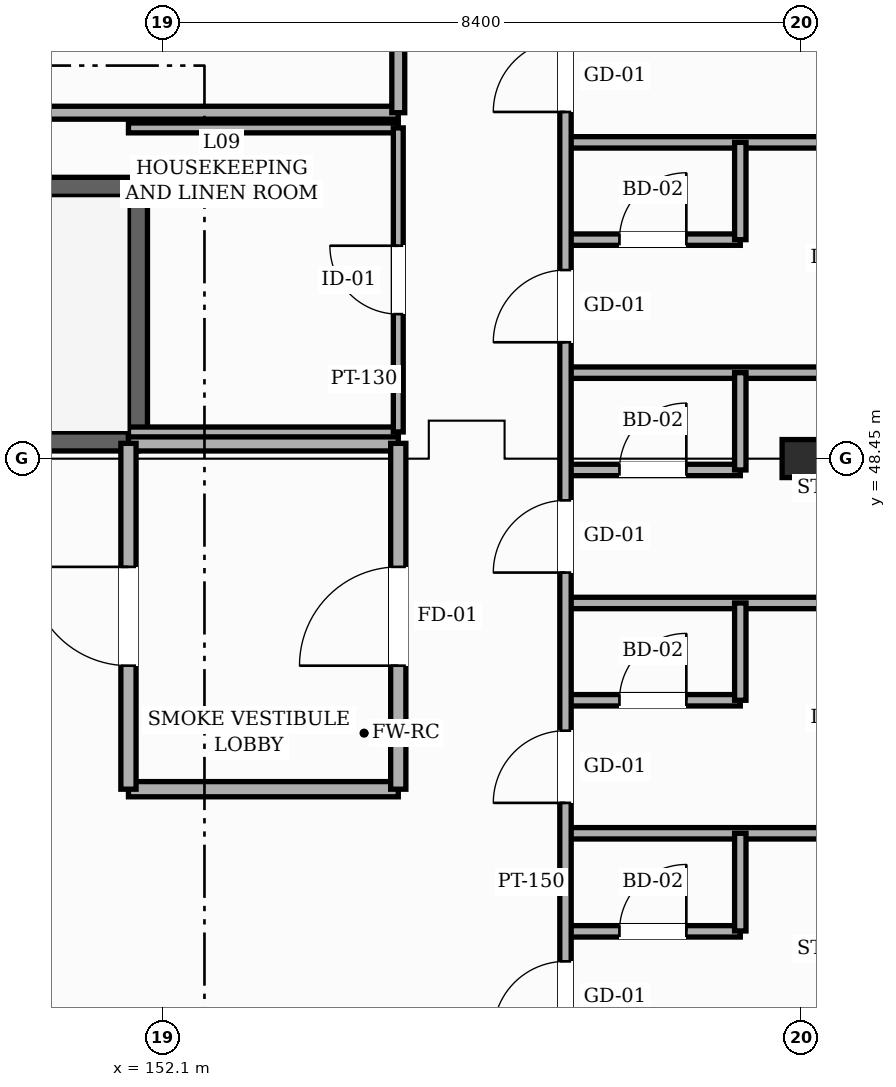
"""IFC4 building model, lengths in metres.
Left out: names, types, materials, properties, quantities, classifications, styles, units other than length and angle.
Written with IfcOpenShell. Run it as: python <this file> out.ifc"""

import sys

from ifc_helpers import new_model, si_unit, direction, frame, frame_2d, origin, origin_2d, place, context, subcontext, project, spatial, rectangle, hollow_rectangle, extrude, element, fill, save


model = new_model("IFC4")
c1 = context("Model", 3, precision=1e-05, world=origin(), true_north=direction((0.0, 1.0)))
c2 = subcontext(c1, "Body", "Model", "MODEL_VIEW")
j1 = project(units=[si_unit("LENGTHUNIT", "METRE"), si_unit("PLANEANGLEUNIT", "RADIAN")], contexts=[c1])
p1 = place(None, origin())
s1 = spatial("IfcSite", under=j1, at=p1, CompositionType="ELEMENT")
p2 = place(p1, origin())
s2 = spatial("IfcBuilding", under=s1, at=p2, CompositionType="ELEMENT")
p3 = place(p2, frame((0.0, 0.0, 39.0)))
s3 = spatial("IfcBuildingStorey", under=s2, at=p3, CompositionType="ELEMENT", Elevation=39.0)
p4 = place(p3, frame((160.5, 48.45, 0.0), z_axis=(0.0, 0.0, 1.0), x_axis=(1.0, 0.0, 0.0)))
e1 = element("IfcColumn", 1, at=p4, inside=s3, PredefinedType="COLUMN", context=c2, shape_type="SweptSolid", body=[
    extrude(hollow_rectangle(XDim=0.5, YDim=0.5, WallThickness=0.022, InnerFilletRadius=0.022, OuterFilletRadius=0.044, at=origin_2d()), origin(), (0.0, 0.0, 1.0), 3.6),
])
p5 = place(p3, frame((151.775, 52.025, 0.0), z_axis=(0.0, 0.0, 1.0), x_axis=(0.0, -1.0, 0.0)))
e2 = element("IfcWall", 2, at=p5, inside=s3, PredefinedType="SHEAR", context=c2, shape_type="SweptSolid", body=[
    extrude(rectangle(XDim=3.35, YDim=0.25, at=frame_2d((1.675, 0.0))), origin(), (0.0, 0.0, 1.0), 3.38),
])
p6 = place(p3, frame((151.775, 48.675, 0.0), z_axis=(0.0, 0.0, 1.0), x_axis=(-1.0, 0.0, 0.0)))
e3 = element("IfcWall", 3, at=p6, inside=s3, PredefinedType="SHEAR", context=c2, shape_type="SweptSolid", body=[
    extrude(rectangle(XDim=7.9, YDim=0.25, at=frame_2d((3.95, 0.0))), origin(), (0.0, 0.0, 1.0), 3.38),
])
p7 = place(p6, frame((6.075, 0.0, 0.0)))
e4 = element("IfcOpeningElement", 4, at=p7, cuts=e3, PredefinedType="OPENING", context=c2, shape_type="SweptSolid", body=[
    extrude(rectangle(XDim=1.3, YDim=2.2, at=frame_2d((0.65, 1.1))), frame((0.0, 0.135, 0.0), z_axis=(0.0, -1.0, 0.0), x_axis=(1.0, 0.0, 0.0)), (0.0, 0.0, 1.0), 0.27),
])
p8 = place(p3, frame((143.875, 52.025, 0.0), z_axis=(0.0, 0.0, 1.0), x_axis=(1.0, 0.0, 0.0)))
e5 = element("IfcWall", 5, at=p8, inside=s3, PredefinedType="SHEAR", context=c2, shape_type="SweptSolid", body=[
    extrude(rectangle(XDim=7.9, YDim=0.25, at=frame_2d((3.95, 0.0))), origin(), (0.0, 0.0, 1.0), 3.38),
])
p9 = place(p3, frame((157.4, 42.23, 0.0), z_axis=(0.0, 0.0, 1.0), x_axis=(1.0, 0.0, 0.0)))
e6 = element("IfcWall", 6, at=p9, inside=s3, PredefinedType="PARTITIONING", context=c2, shape_type="SweptSolid", body=[
    extrude(rectangle(XDim=2.3, YDim=0.15, at=frame_2d((1.15, 0.0))), origin(), (0.0, 0.0, 1.0), 3.365),
])
p10 = place(p9, frame((0.71, 0.0, 0.0)))
e7 = element("IfcOpeningElement", 7, at=p10, cuts=e6, PredefinedType="OPENING", context=c2, shape_type="SweptSolid", body=[
    extrude(rectangle(XDim=0.88, YDim=2.12, at=frame_2d((0.44, 1.06))), frame((0.0, 0.085, 0.0), z_axis=(0.0, -1.0, 0.0), x_axis=(1.0, 0.0, 0.0)), (0.0, 0.0, 1.0), 0.17),
])
p11 = place(p3, frame((157.4, 43.52, 0.0), z_axis=(0.0, 0.0, 1.0), x_axis=(1.0, 0.0, 0.0)))
e8 = element("IfcWall", 8, at=p11, inside=s3, PredefinedType="PARTITIONING", context=c2, shape_type="SweptSolid", body=[
    extrude(rectangle(XDim=9.8, YDim=0.15, at=frame_2d((4.9, 0.0))), origin(), (0.0, 0.0, 1.0), 3.365),
])
p12 = place(p3, frame((151.65, 44.1, 0.0), z_axis=(0.0, 0.0, 1.0), x_axis=(1.0, 0.0, 0.0)))
e9 = element("IfcWall", 9, at=p12, inside=s3, PredefinedType="SOLIDWALL", context=c2, shape_type="SweptSolid", body=[
    extrude(rectangle(XDim=3.55, YDim=0.2, at=frame_2d((1.775, 0.0))), origin(), (0.0, 0.0, 1.0), 3.365),
])
p13 = place(p3, frame((157.4, 45.27, 0.0), z_axis=(0.0, 0.0, 1.0), x_axis=(1.0, 0.0, 0.0)))
e10 = element("IfcWall", 10, at=p13, inside=s3, PredefinedType="PARTITIONING", context=c2, shape_type="SweptSolid", body=[
    extrude(rectangle(XDim=2.3, YDim=0.15, at=frame_2d((1.15, 0.0))), origin(), (0.0, 0.0, 1.0), 3.365),
])
p14 = place(p13, frame((0.71, 0.0, 0.0)))
e11 = element("IfcOpeningElement", 11, at=p14, cuts=e10, PredefinedType="OPENING", context=c2, shape_type="SweptSolid", body=[
    extrude(rectangle(XDim=0.88, YDim=2.12, at=frame_2d((0.44, 1.06))), frame((0.0, 0.085, 0.0), z_axis=(0.0, -1.0, 0.0), x_axis=(1.0, 0.0, 0.0)), (0.0, 0.0, 1.0), 0.17),
])
p15 = place(p3, frame((157.4, 46.55, 0.0), z_axis=(0.0, 0.0, 1.0), x_axis=(1.0, 0.0, 0.0)))
e12 = element("IfcWall", 12, at=p15, inside=s3, PredefinedType="PARTITIONING", context=c2, shape_type="SweptSolid", body=[
    extrude(rectangle(XDim=9.8, YDim=0.15, at=frame_2d((4.9, 0.0))), origin(), (0.0, 0.0, 1.0), 3.365),
])
p16 = place(p3, frame((157.4, 48.3, 0.0), z_axis=(0.0, 0.0, 1.0), x_axis=(1.0, 0.0, 0.0)))
e13 = element("IfcWall", 13, at=p16, inside=s3, PredefinedType="PARTITIONING", context=c2, shape_type="SweptSolid", body=[
    extrude(rectangle(XDim=2.3, YDim=0.15, at=frame_2d((1.15, 0.0))), origin(), (0.0, 0.0, 1.0), 3.365),
])
p17 = place(p16, frame((0.71, 0.0, 0.0)))
e14 = element("IfcOpeningElement", 14, at=p17, cuts=e13, PredefinedType="OPENING", context=c2, shape_type="SweptSolid", body=[
    extrude(rectangle(XDim=0.88, YDim=2.12, at=frame_2d((0.44, 1.06))), frame((0.0, 0.085, 0.0), z_axis=(0.0, -1.0, 0.0), x_axis=(1.0, 0.0, 0.0)), (0.0, 0.0, 1.0), 0.17),
])
p18 = place(p3, frame((151.65, 48.65, 0.0), z_axis=(0.0, 0.0, 1.0), x_axis=(1.0, 0.0, 0.0)))
e15 = element("IfcWall", 15, at=p18, inside=s3, PredefinedType="SOLIDWALL", context=c2, shape_type="SweptSolid", body=[
    extrude(rectangle(XDim=3.55, YDim=0.2, at=frame_2d((1.775, 0.0))), origin(), (0.0, 0.0, 1.0), 3.365),
])
p19 = place(p3, frame((151.65, 48.8, 0.0), z_axis=(0.0, 0.0, 1.0), x_axis=(1.0, 0.0, 0.0)))
e16 = element("IfcWall", 16, at=p19, inside=s3, PredefinedType="PARTITIONING", context=c2, shape_type="SweptSolid", body=[
    extrude(rectangle(XDim=3.55, YDim=0.13, at=frame_2d((1.775, 0.0))), origin(), (0.0, 0.0, 1.0), 3.365),
])
p20 = place(p3, frame((157.4, 49.58, 0.0), z_axis=(0.0, 0.0, 1.0), x_axis=(1.0, 0.0, 0.0)))
e17 = element("IfcWall", 17, at=p20, inside=s3, PredefinedType="PARTITIONING", context=c2, shape_type="SweptSolid", body=[
    extrude(rectangle(XDim=9.8, YDim=0.15, at=frame_2d((4.9, 0.0))), origin(), (0.0, 0.0, 1.0), 3.365),
])
p21 = place(p3, frame((157.4, 51.33, 0.0), z_axis=(0.0, 0.0, 1.0), x_axis=(1.0, 0.0, 0.0)))
e18 = element("IfcWall", 18, at=p21, inside=s3, PredefinedType="PARTITIONING", context=c2, shape_type="SweptSolid", body=[
    extrude(rectangle(XDim=2.3, YDim=0.15, at=frame_2d((1.15, 0.0))), origin(), (0.0, 0.0, 1.0), 3.365),
])
p22 = place(p21, frame((0.71, 0.0, 0.0)))
e19 = element("IfcOpeningElement", 19, at=p22, cuts=e18, PredefinedType="OPENING", context=c2, shape_type="SweptSolid", body=[
    extrude(rectangle(XDim=0.88, YDim=2.12, at=frame_2d((0.44, 1.06))), frame((0.0, 0.085, 0.0), z_axis=(0.0, -1.0, 0.0), x_axis=(1.0, 0.0, 0.0)), (0.0, 0.0, 1.0), 0.17),
])
p23 = place(p3, frame((157.4, 52.61, 0.0), z_axis=(0.0, 0.0, 1.0), x_axis=(1.0, 0.0, 0.0)))
e20 = element("IfcWall", 20, at=p23, inside=s3, PredefinedType="PARTITIONING", context=c2, shape_type="SweptSolid", body=[
    extrude(rectangle(XDim=9.8, YDim=0.15, at=frame_2d((4.9, 0.0))), origin(), (0.0, 0.0, 1.0), 3.055),
])
p24 = place(p3, frame((151.65, 52.8, 0.0), z_axis=(0.0, 0.0, 1.0), x_axis=(1.0, 0.0, 0.0)))
e21 = element("IfcWall", 21, at=p24, inside=s3, PredefinedType="PARTITIONING", context=c2, shape_type="SweptSolid", body=[
    extrude(rectangle(XDim=3.55, YDim=0.13, at=frame_2d((1.775, 0.0))), origin(), (0.0, 0.0, 1.0), 3.365),
])
p25 = place(p3, frame((144.8, 53.0, 0.0), z_axis=(0.0, 0.0, 1.0), x_axis=(1.0, 0.0, 0.0)))
e22 = element("IfcWall", 22, at=p25, inside=s3, PredefinedType="PARTITIONING", context=c2, shape_type="SweptSolid", body=[
    extrude(rectangle(XDim=10.4, YDim=0.17, at=frame_2d((5.2, 0.0))), origin(), (0.0, 0.0, 1.0), 3.365),
])
p26 = place(p3, frame((151.65, 44.1, 0.0), z_axis=(0.0, 0.0, 1.0), x_axis=(0.0, 1.0, 0.0)))
e23 = element("IfcWall", 23, at=p26, inside=s3, PredefinedType="SOLIDWALL", context=c2, shape_type="SweptSolid", body=[
    extrude(rectangle(XDim=4.55, YDim=0.2, at=frame_2d((2.275, 0.0))), origin(), (0.0, 0.0, 1.0), 3.365),
])
p27 = place(p26, frame((1.625, 0.0, 0.0)))
e24 = element("IfcOpeningElement", 24, at=p27, cuts=e23, PredefinedType="OPENING", context=c2, shape_type="SweptSolid", body=[
    extrude(rectangle(XDim=1.3, YDim=2.2, at=frame_2d((0.65, 1.1))), frame((0.0, 0.11, 0.0), z_axis=(0.0, -1.0, 0.0), x_axis=(1.0, 0.0, 0.0)), (0.0, 0.0, 1.0), 0.22),
])
p28 = place(p3, frame((155.2, 44.1, 0.0), z_axis=(0.0, 0.0, 1.0), x_axis=(0.0, 1.0, 0.0)))
e25 = element("IfcWall", 25, at=p28, inside=s3, PredefinedType="SOLIDWALL", context=c2, shape_type="SweptSolid", body=[
    extrude(rectangle(XDim=4.55, YDim=0.2, at=frame_2d((2.275, 0.0))), origin(), (0.0, 0.0, 1.0), 3.365),
])
p29 = place(p28, frame((1.625, 0.0, 0.0)))
e26 = element("IfcOpeningElement", 26, at=p29, cuts=e25, PredefinedType="OPENING", context=c2, shape_type="SweptSolid", body=[
    extrude(rectangle(XDim=1.3, YDim=2.2, at=frame_2d((0.65, 1.1))), frame((0.0, 0.11, 0.0), z_axis=(0.0, -1.0, 0.0), x_axis=(1.0, 0.0, 0.0)), (0.0, 0.0, 1.0), 0.22),
])
p30 = place(p3, frame((155.2, 48.8, 0.0), z_axis=(0.0, 0.0, 1.0), x_axis=(0.0, 1.0, 0.0)))
e27 = element("IfcWall", 27, at=p30, inside=s3, PredefinedType="PARTITIONING", context=c2, shape_type="SweptSolid", body=[
    extrude(rectangle(XDim=4.0, YDim=0.13, at=frame_2d((2.0, 0.0))), origin(), (0.0, 0.0, 1.0), 3.365),
])
p31 = place(p30, frame((1.55, 0.0, 0.0)))
e28 = element("IfcOpeningElement", 28, at=p31, cuts=e27, PredefinedType="OPENING", context=c2, shape_type="SweptSolid", body=[
    extrude(rectangle(XDim=0.9, YDim=2.15, at=frame_2d((0.45, 1.075))), frame((0.0, 0.075, 0.0), z_axis=(0.0, -1.0, 0.0), x_axis=(1.0, 0.0, 0.0)), (0.0, 0.0, 1.0), 0.15),
])
p32 = place(p3, frame((155.2, 53.0, 0.0), z_axis=(0.0, 0.0, 1.0), x_axis=(0.0, 1.0, 0.0)))
e29 = element("IfcWall", 29, at=p32, inside=s3, PredefinedType="PARTITIONING", context=c2, shape_type="SweptSolid", body=[
    extrude(rectangle(XDim=6.45, YDim=0.17, at=frame_2d((3.225, 0.0))), origin(), (0.0, 0.0, 1.0), 3.365),
])
p33 = place(p32, frame((2.625, 0.0, 0.0)))
e30 = element("IfcOpeningElement", 30, at=p33, cuts=e29, PredefinedType="OPENING", context=c2, shape_type="SweptSolid", body=[
    extrude(rectangle(XDim=1.2, YDim=2.2, at=frame_2d((0.6, 1.1))), frame((0.0, 0.095, 0.0), z_axis=(0.0, -1.0, 0.0), x_axis=(1.0, 0.0, 0.0)), (0.0, 0.0, 1.0), 0.19),
])
p34 = place(p3, frame((157.4, 22.3, 0.0), z_axis=(0.0, 0.0, 1.0), x_axis=(0.0, 1.0, 0.0)))
e31 = element("IfcWall", 31, at=p34, inside=s3, PredefinedType="PARTITIONING", context=c2, shape_type="SweptSolid", body=[
    extrude(rectangle(XDim=48.5, YDim=0.15, at=frame_2d((24.25, 0.0))), origin(), (0.0, 0.0, 1.0), 3.365),
])
p35 = place(p34, frame((0.325, 0.0, 0.0)))
e32 = element("IfcOpeningElement", 32, at=p35, cuts=e31, PredefinedType="OPENING", context=c2, shape_type="SweptSolid", body=[
    extrude(rectangle(XDim=1.1, YDim=2.2, at=frame_2d((0.55, 1.1))), frame((0.0, 0.085, 0.0), z_axis=(0.0, -1.0, 0.0), x_axis=(1.0, 0.0, 0.0)), (0.0, 0.0, 1.0), 0.17),
])
p36 = place(p34, frame((3.43, 0.0, 0.0)))
e33 = element("IfcOpeningElement", 33, at=p36, cuts=e31, PredefinedType="OPENING", context=c2, shape_type="SweptSolid", body=[
    extrude(rectangle(XDim=0.95, YDim=2.15, at=frame_2d((0.475, 1.075))), frame((0.0, 0.085, 0.0), z_axis=(0.0, -1.0, 0.0), x_axis=(1.0, 0.0, 0.0)), (0.0, 0.0, 1.0), 0.17),
])
p37 = place(p34, frame((6.46, 0.0, 0.0)))
e34 = element("IfcOpeningElement", 34, at=p37, cuts=e31, PredefinedType="OPENING", context=c2, shape_type="SweptSolid", body=[
    extrude(rectangle(XDim=0.95, YDim=2.15, at=frame_2d((0.475, 1.075))), frame((0.0, 0.085, 0.0), z_axis=(0.0, -1.0, 0.0), x_axis=(1.0, 0.0, 0.0)), (0.0, 0.0, 1.0), 0.17),
])
p38 = place(p34, frame((9.495, 0.0, 0.0)))
e35 = element("IfcOpeningElement", 35, at=p38, cuts=e31, PredefinedType="OPENING", context=c2, shape_type="SweptSolid", body=[
    extrude(rectangle(XDim=0.95, YDim=2.15, at=frame_2d((0.475, 1.075))), frame((0.0, 0.085, 0.0), z_axis=(0.0, -1.0, 0.0), x_axis=(1.0, 0.0, 0.0)), (0.0, 0.0, 1.0), 0.17),
])
p39 = place(p34, frame((12.525, 0.0, 0.0)))
e36 = element("IfcOpeningElement", 36, at=p39, cuts=e31, PredefinedType="OPENING", context=c2, shape_type="SweptSolid", body=[
    extrude(rectangle(XDim=0.95, YDim=2.15, at=frame_2d((0.475, 1.075))), frame((0.0, 0.085, 0.0), z_axis=(0.0, -1.0, 0.0), x_axis=(1.0, 0.0, 0.0)), (0.0, 0.0, 1.0), 0.17),
])
p40 = place(p34, frame((15.555, 0.0, 0.0)))
e37 = element("IfcOpeningElement", 37, at=p40, cuts=e31, PredefinedType="OPENING", context=c2, shape_type="SweptSolid", body=[
    extrude(rectangle(XDim=0.95, YDim=2.15, at=frame_2d((0.475, 1.075))), frame((0.0, 0.085, 0.0), z_axis=(0.0, -1.0, 0.0), x_axis=(1.0, 0.0, 0.0)), (0.0, 0.0, 1.0), 0.17),
])
p41 = place(p34, frame((18.585, 0.0, 0.0)))
e38 = element("IfcOpeningElement", 38, at=p41, cuts=e31, PredefinedType="OPENING", context=c2, shape_type="SweptSolid", body=[
    extrude(rectangle(XDim=0.95, YDim=2.15, at=frame_2d((0.475, 1.075))), frame((0.0, 0.085, 0.0), z_axis=(0.0, -1.0, 0.0), x_axis=(1.0, 0.0, 0.0)), (0.0, 0.0, 1.0), 0.17),
])
p42 = place(p34, frame((21.62, 0.0, 0.0)))
e39 = element("IfcOpeningElement", 39, at=p42, cuts=e31, PredefinedType="OPENING", context=c2, shape_type="SweptSolid", body=[
    extrude(rectangle(XDim=0.95, YDim=2.15, at=frame_2d((0.475, 1.075))), frame((0.0, 0.085, 0.0), z_axis=(0.0, -1.0, 0.0), x_axis=(1.0, 0.0, 0.0)), (0.0, 0.0, 1.0), 0.17),
])
p43 = place(p34, frame((24.65, 0.0, 0.0)))
e40 = element("IfcOpeningElement", 40, at=p43, cuts=e31, PredefinedType="OPENING", context=c2, shape_type="SweptSolid", body=[
    extrude(rectangle(XDim=0.95, YDim=2.15, at=frame_2d((0.475, 1.075))), frame((0.0, 0.085, 0.0), z_axis=(0.0, -1.0, 0.0), x_axis=(1.0, 0.0, 0.0)), (0.0, 0.0, 1.0), 0.17),
])
p44 = place(p34, frame((27.68, 0.0, 0.0)))
e41 = element("IfcOpeningElement", 41, at=p44, cuts=e31, PredefinedType="OPENING", context=c2, shape_type="SweptSolid", body=[
    extrude(rectangle(XDim=0.95, YDim=2.15, at=frame_2d((0.475, 1.075))), frame((0.0, 0.085, 0.0), z_axis=(0.0, -1.0, 0.0), x_axis=(1.0, 0.0, 0.0)), (0.0, 0.0, 1.0), 0.17),
])
p45 = place(p34, frame((30.71, 0.0, 0.0)))
e42 = element("IfcOpeningElement", 42, at=p45, cuts=e31, PredefinedType="OPENING", context=c2, shape_type="SweptSolid", body=[
    extrude(rectangle(XDim=0.95, YDim=2.15, at=frame_2d((0.475, 1.075))), frame((0.0, 0.085, 0.0), z_axis=(0.0, -1.0, 0.0), x_axis=(1.0, 0.0, 0.0)), (0.0, 0.0, 1.0), 0.17),
])
p46 = place(p34, frame((33.745, 0.0, 0.0)))
e43 = element("IfcOpeningElement", 43, at=p46, cuts=e31, PredefinedType="OPENING", context=c2, shape_type="SweptSolid", body=[
    extrude(rectangle(XDim=0.95, YDim=2.15, at=frame_2d((0.475, 1.075))), frame((0.0, 0.085, 0.0), z_axis=(0.0, -1.0, 0.0), x_axis=(1.0, 0.0, 0.0)), (0.0, 0.0, 1.0), 0.17),
])
p47 = place(p34, frame((36.775, 0.0, 0.0)))
e44 = element("IfcOpeningElement", 44, at=p47, cuts=e31, PredefinedType="OPENING", context=c2, shape_type="SweptSolid", body=[
    extrude(rectangle(XDim=0.95, YDim=2.15, at=frame_2d((0.475, 1.075))), frame((0.0, 0.085, 0.0), z_axis=(0.0, -1.0, 0.0), x_axis=(1.0, 0.0, 0.0)), (0.0, 0.0, 1.0), 0.17),
])
p48 = place(p34, frame((39.805, 0.0, 0.0)))
e45 = element("IfcOpeningElement", 45, at=p48, cuts=e31, PredefinedType="OPENING", context=c2, shape_type="SweptSolid", body=[
    extrude(rectangle(XDim=0.95, YDim=2.15, at=frame_2d((0.475, 1.075))), frame((0.0, 0.085, 0.0), z_axis=(0.0, -1.0, 0.0), x_axis=(1.0, 0.0, 0.0)), (0.0, 0.0, 1.0), 0.17),
])
p49 = place(p34, frame((42.84, 0.0, 0.0)))
e46 = element("IfcOpeningElement", 46, at=p49, cuts=e31, PredefinedType="OPENING", context=c2, shape_type="SweptSolid", body=[
    extrude(rectangle(XDim=0.95, YDim=2.15, at=frame_2d((0.475, 1.075))), frame((0.0, 0.085, 0.0), z_axis=(0.0, -1.0, 0.0), x_axis=(1.0, 0.0, 0.0)), (0.0, 0.0, 1.0), 0.17),
])
p50 = place(p34, frame((45.87, 0.0, 0.0)))
e47 = element("IfcOpeningElement", 47, at=p50, cuts=e31, PredefinedType="OPENING", context=c2, shape_type="SweptSolid", body=[
    extrude(rectangle(XDim=0.95, YDim=2.15, at=frame_2d((0.475, 1.075))), frame((0.0, 0.085, 0.0), z_axis=(0.0, -1.0, 0.0), x_axis=(1.0, 0.0, 0.0)), (0.0, 0.0, 1.0), 0.17),
])
p51 = place(p3, frame((159.7, 42.235, 0.0), z_axis=(0.0, 0.0, 1.0), x_axis=(0.0, 1.0, 0.0)))
e48 = element("IfcWall", 48, at=p51, inside=s3, PredefinedType="PARTITIONING", context=c2, shape_type="SweptSolid", body=[
    extrude(rectangle(XDim=1.285, YDim=0.15, at=frame_2d((0.643, 0.0))), origin(), (0.0, 0.0, 1.0), 3.365),
])
for number, where, z_axis, x_axis in (
    (49, (159.7, 45.27, 0.0), (0.0, 0.0, 1.0), (0.0, 1.0, 0.0)),
    (50, (159.7, 48.3, 0.0), (0.0, 0.0, 1.0), (0.0, 1.0, 0.0)),
    (51, (159.7, 51.33, 0.0), (0.0, 0.0, 1.0), (0.0, 1.0, 0.0)),
):
    element("IfcWall", number, at=place(p3, frame(where, z_axis=z_axis, x_axis=x_axis)), inside=s3, PredefinedType="PARTITIONING", context=c2, shape_type="SweptSolid", body=[
        extrude(rectangle(XDim=1.28, YDim=0.15, at=frame_2d((0.64, 0.0))), origin(), (0.0, 0.0, 1.0), 3.365),
    ])
p52 = place(p27, origin())
e52 = element("IfcDoor", 52, at=p52, inside=s3, OperationType="SINGLE_SWING_RIGHT", PredefinedType="DOOR", context=c2, shape_type="SweptSolid", body=[
    extrude(rectangle(XDim=1.3, YDim=2.2, at=frame_2d((0.65, 1.1))), frame((0.0, 0.025, 0.0), z_axis=(0.0, -1.0, 0.0), x_axis=(1.0, 0.0, 0.0)), (0.0, 0.0, 1.0), 0.05),
])
fill(e24, e52)
p53 = place(p29, origin())
e53 = element("IfcDoor", 53, at=p53, inside=s3, OperationType="SINGLE_SWING_LEFT", PredefinedType="DOOR", context=c2, shape_type="SweptSolid", body=[
    extrude(rectangle(XDim=1.3, YDim=2.2, at=frame_2d((0.65, 1.1))), frame((0.0, 0.025, 0.0), z_axis=(0.0, -1.0, 0.0), x_axis=(1.0, 0.0, 0.0)), (0.0, 0.0, 1.0), 0.05),
])
fill(e26, e53)
p54 = place(p31, origin())
e54 = element("IfcDoor", 54, at=p54, inside=s3, OperationType="SINGLE_SWING_RIGHT", PredefinedType="DOOR", context=c2, shape_type="SweptSolid", body=[
    extrude(rectangle(XDim=0.9, YDim=2.15, at=frame_2d((0.45, 1.075))), frame((0.0, 0.025, 0.0), z_axis=(0.0, -1.0, 0.0), x_axis=(1.0, 0.0, 0.0)), (0.0, 0.0, 1.0), 0.05),
])
fill(e28, e54)
p55 = place(p41, origin())
e55 = element("IfcDoor", 55, at=p55, inside=s3, OperationType="SINGLE_SWING_LEFT", PredefinedType="DOOR", context=c2, shape_type="SweptSolid", body=[
    extrude(rectangle(XDim=0.95, YDim=2.15, at=frame_2d((0.475, 1.075))), frame((0.0, 0.025, 0.0), z_axis=(0.0, -1.0, 0.0), x_axis=(1.0, 0.0, 0.0)), (0.0, 0.0, 1.0), 0.05),
])
fill(e38, e55)
p56 = place(p10, origin())
e56 = element("IfcDoor", 56, at=p56, inside=s3, OperationType="SINGLE_SWING_RIGHT", PredefinedType="DOOR", context=c2, shape_type="SweptSolid", body=[
    extrude(rectangle(XDim=0.88, YDim=2.12, at=frame_2d((0.44, 1.06))), frame((0.0, 0.025, 0.0), z_axis=(0.0, -1.0, 0.0), x_axis=(1.0, 0.0, 0.0)), (0.0, 0.0, 1.0), 0.05),
])
fill(e7, e56)
p57 = place(p42, origin())
e57 = element("IfcDoor", 57, at=p57, inside=s3, OperationType="SINGLE_SWING_LEFT", PredefinedType="DOOR", context=c2, shape_type="SweptSolid", body=[
    extrude(rectangle(XDim=0.95, YDim=2.15, at=frame_2d((0.475, 1.075))), frame((0.0, 0.025, 0.0), z_axis=(0.0, -1.0, 0.0), x_axis=(1.0, 0.0, 0.0)), (0.0, 0.0, 1.0), 0.05),
])
fill(e39, e57)
p58 = place(p14, origin())
e58 = element("IfcDoor", 58, at=p58, inside=s3, OperationType="SINGLE_SWING_RIGHT", PredefinedType="DOOR", context=c2, shape_type="SweptSolid", body=[
    extrude(rectangle(XDim=0.88, YDim=2.12, at=frame_2d((0.44, 1.06))), frame((0.0, 0.025, 0.0), z_axis=(0.0, -1.0, 0.0), x_axis=(1.0, 0.0, 0.0)), (0.0, 0.0, 1.0), 0.05),
])
fill(e11, e58)
p59 = place(p43, origin())
e59 = element("IfcDoor", 59, at=p59, inside=s3, OperationType="SINGLE_SWING_LEFT", PredefinedType="DOOR", context=c2, shape_type="SweptSolid", body=[
    extrude(rectangle(XDim=0.95, YDim=2.15, at=frame_2d((0.475, 1.075))), frame((0.0, 0.025, 0.0), z_axis=(0.0, -1.0, 0.0), x_axis=(1.0, 0.0, 0.0)), (0.0, 0.0, 1.0), 0.05),
])
fill(e40, e59)
p60 = place(p17, origin())
e60 = element("IfcDoor", 60, at=p60, inside=s3, OperationType="SINGLE_SWING_RIGHT", PredefinedType="DOOR", context=c2, shape_type="SweptSolid", body=[
    extrude(rectangle(XDim=0.88, YDim=2.12, at=frame_2d((0.44, 1.06))), frame((0.0, 0.025, 0.0), z_axis=(0.0, -1.0, 0.0), x_axis=(1.0, 0.0, 0.0)), (0.0, 0.0, 1.0), 0.05),
])
fill(e14, e60)
p61 = place(p44, origin())
e61 = element("IfcDoor", 61, at=p61, inside=s3, OperationType="SINGLE_SWING_LEFT", PredefinedType="DOOR", context=c2, shape_type="SweptSolid", body=[
    extrude(rectangle(XDim=0.95, YDim=2.15, at=frame_2d((0.475, 1.075))), frame((0.0, 0.025, 0.0), z_axis=(0.0, -1.0, 0.0), x_axis=(1.0, 0.0, 0.0)), (0.0, 0.0, 1.0), 0.05),
])
fill(e41, e61)
p62 = place(p22, origin())
e62 = element("IfcDoor", 62, at=p62, inside=s3, OperationType="SINGLE_SWING_RIGHT", PredefinedType="DOOR", context=c2, shape_type="SweptSolid", body=[
    extrude(rectangle(XDim=0.88, YDim=2.12, at=frame_2d((0.44, 1.06))), frame((0.0, 0.025, 0.0), z_axis=(0.0, -1.0, 0.0), x_axis=(1.0, 0.0, 0.0)), (0.0, 0.0, 1.0), 0.05),
])
fill(e19, e62)
p63 = place(p45, origin())
e63 = element("IfcDoor", 63, at=p63, inside=s3, OperationType="SINGLE_SWING_LEFT", PredefinedType="DOOR", context=c2, shape_type="SweptSolid", body=[
    extrude(rectangle(XDim=0.95, YDim=2.15, at=frame_2d((0.475, 1.075))), frame((0.0, 0.025, 0.0), z_axis=(0.0, -1.0, 0.0), x_axis=(1.0, 0.0, 0.0)), (0.0, 0.0, 1.0), 0.05),
])
fill(e42, e63)
save(model, sys.argv[1])
